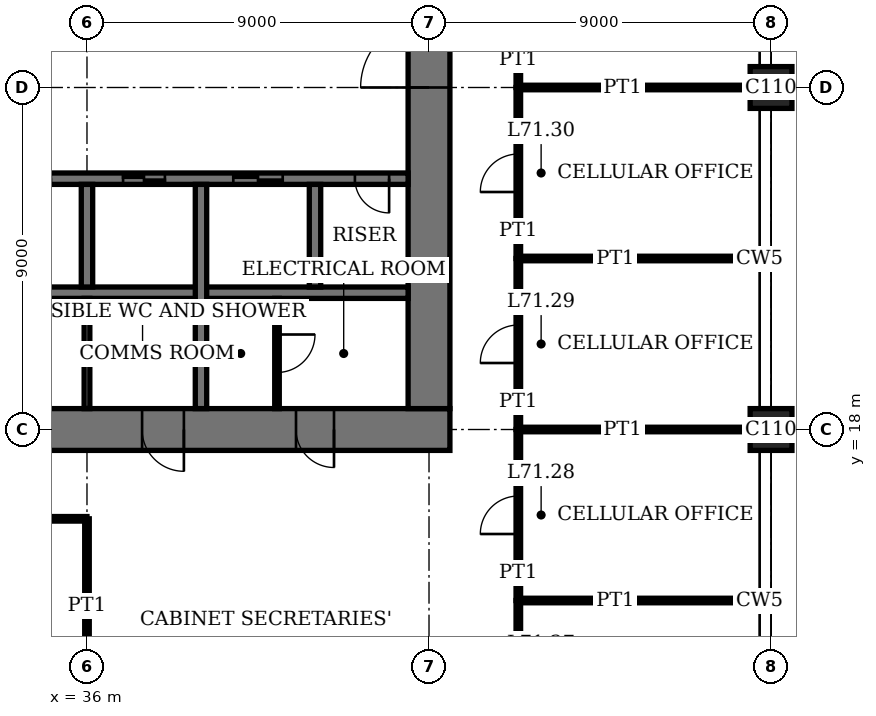
"""IFC4 building model, lengths in metres.
Left out: names, types, materials, properties, quantities, classifications, styles, units other than length and angle.
Written with IfcOpenShell. Run it as: python <this file> out.ifc"""

import sys

from ifc_helpers import new_model, si_unit, direction, frame, frame_2d, origin, origin_2d, place, context, subcontext, project, spatial, rectangle, extrude, element, fill, save


model = new_model("IFC4")
c1 = context("Model", 3, precision=1e-05, world=origin(), true_north=direction((0.0, 1.0)))
c2 = subcontext(c1, "Body", "Model", "MODEL_VIEW")
j1 = project(units=[si_unit("LENGTHUNIT", "METRE"), si_unit("PLANEANGLEUNIT", "RADIAN")], contexts=[c1])
p1 = place(None, origin())
s1 = spatial("IfcSite", under=j1, at=p1, CompositionType="ELEMENT")
p2 = place(p1, origin())
s2 = spatial("IfcBuilding", under=s1, at=p2, CompositionType="ELEMENT")
p3 = place(p2, frame((0.0, 0.0, 291.4)))
s3 = spatial("IfcBuildingStorey", under=s2, at=p3, CompositionType="ELEMENT", Elevation=291.4)
for number, where, z_axis, x_axis in (
    (1, (54.0, 18.0, 0.0), (0.0, 0.0, 1.0), (1.0, 0.0, 0.0)),
    (2, (54.0, 27.0, 0.0), (0.0, 0.0, 1.0), (1.0, 0.0, 0.0)),
):
    element("IfcColumn", number, at=place(p3, frame(where, z_axis=z_axis, x_axis=x_axis)), inside=s3, PredefinedType="COLUMN", context=c2, shape_type="SweptSolid", body=[
        extrude(rectangle(XDim=1.1, YDim=1.1, at=origin_2d()), origin(), (0.0, 0.0, 1.0), 4.0),
    ])
p4 = place(p3, frame((17.45, 18.0, 0.0), z_axis=(0.0, 0.0, 1.0), x_axis=(1.0, 0.0, 0.0)))
e3 = element("IfcWall", 3, at=p4, inside=s3, PredefinedType="SHEAR", context=c2, shape_type="SweptSolid", body=[
    extrude(rectangle(XDim=28.1, YDim=1.1, at=frame_2d((14.05, 0.0))), origin(), (0.0, 0.0, 1.0), 4.0),
])
p5 = place(p4, frame((11.55, 0.0, 0.0)))
e4 = element("IfcOpeningElement", 4, at=p5, cuts=e3, PredefinedType="OPENING", context=c2, shape_type="SweptSolid", body=[
    extrude(rectangle(XDim=1.0, YDim=2.4, at=frame_2d((0.5, 1.2))), frame((0.0, 0.56, 0.0), z_axis=(0.0, -1.0, 0.0), x_axis=(1.0, 0.0, 0.0)), (0.0, 0.0, 1.0), 1.12),
])
p6 = place(p4, frame((16.55, 0.0, 0.0)))
e5 = element("IfcOpeningElement", 5, at=p6, cuts=e3, PredefinedType="OPENING", context=c2, shape_type="SweptSolid", body=[
    extrude(rectangle(XDim=1.0, YDim=2.4, at=frame_2d((0.5, 1.2))), frame((0.0, 0.56, 0.0), z_axis=(0.0, -1.0, 0.0), x_axis=(1.0, 0.0, 0.0)), (0.0, 0.0, 1.0), 1.12),
])
p7 = place(p4, frame((20.0, 0.0, 0.0)))
e6 = element("IfcOpeningElement", 6, at=p7, cuts=e3, PredefinedType="OPENING", context=c2, shape_type="SweptSolid", body=[
    extrude(rectangle(XDim=1.1, YDim=2.4, at=frame_2d((0.55, 1.2))), frame((0.0, 0.56, 0.0), z_axis=(0.0, -1.0, 0.0), x_axis=(1.0, 0.0, 0.0)), (0.0, 0.0, 1.0), 1.12),
])
p8 = place(p4, frame((24.05, 0.0, 0.0)))
e7 = element("IfcOpeningElement", 7, at=p8, cuts=e3, PredefinedType="OPENING", context=c2, shape_type="SweptSolid", body=[
    extrude(rectangle(XDim=1.0, YDim=2.4, at=frame_2d((0.5, 1.2))), frame((0.0, 0.56, 0.0), z_axis=(0.0, -1.0, 0.0), x_axis=(1.0, 0.0, 0.0)), (0.0, 0.0, 1.0), 1.12),
])
p9 = place(p3, frame((45.0, 18.55, 0.0), z_axis=(0.0, 0.0, 1.0), x_axis=(0.0, 1.0, 0.0)))
e8 = element("IfcWall", 8, at=p9, inside=s3, PredefinedType="SHEAR", context=c2, shape_type="SweptSolid", body=[
    extrude(rectangle(XDim=16.9, YDim=1.1, at=frame_2d((8.45, 0.0))), origin(), (0.0, 0.0, 1.0), 4.0),
])
p10 = place(p9, frame((8.45, 0.0, 0.0)))
e9 = element("IfcOpeningElement", 9, at=p10, cuts=e8, PredefinedType="OPENING", context=c2, shape_type="SweptSolid", body=[
    extrude(rectangle(XDim=1.8, YDim=2.4, at=frame_2d((0.9, 1.2))), frame((0.0, 0.56, 0.0), z_axis=(0.0, -1.0, 0.0), x_axis=(1.0, 0.0, 0.0)), (0.0, 0.0, 1.0), 1.12),
])
p11 = place(p3, frame((18.55, 24.6, 0.0), z_axis=(0.0, 0.0, 1.0), x_axis=(1.0, 0.0, 0.0)))
e10 = element("IfcWall", 10, at=p11, inside=s3, PredefinedType="SHEAR", context=c2, shape_type="SweptSolid", body=[
    extrude(rectangle(XDim=25.9, YDim=0.3, at=frame_2d((12.95, 0.0))), origin(), (0.0, 0.0, 1.0), 4.0),
])
p12 = place(p11, frame((4.95, 0.0, 0.0)))
e11 = element("IfcOpeningElement", 11, at=p12, cuts=e10, PredefinedType="OPENING", context=c2, shape_type="SweptSolid", body=[
    extrude(rectangle(XDim=1.0, YDim=2.4, at=frame_2d((0.5, 1.2))), frame((0.0, 0.16, 0.0), z_axis=(0.0, -1.0, 0.0), x_axis=(1.0, 0.0, 0.0)), (0.0, 0.0, 1.0), 0.32),
])
p13 = place(p11, frame((24.5, 0.0, 0.0)))
e12 = element("IfcOpeningElement", 12, at=p13, cuts=e10, PredefinedType="OPENING", context=c2, shape_type="SweptSolid", body=[
    extrude(rectangle(XDim=0.9, YDim=2.1, at=frame_2d((0.45, 1.05))), frame((0.0, 0.16, 0.0), z_axis=(0.0, -1.0, 0.0), x_axis=(1.0, 0.0, 0.0)), (0.0, 0.0, 1.0), 0.32),
])
p14 = place(p11, frame((9.4, 0.0, 0.0)))
e13 = element("IfcOpeningElement", 13, at=p14, cuts=e10, PredefinedType="OPENING", context=c2, shape_type="SweptSolid", body=[
    extrude(rectangle(XDim=1.1, YDim=2.4, at=frame_2d((0.55, 1.2))), frame((0.0, 0.16, 0.0), z_axis=(0.0, -1.0, 0.0), x_axis=(1.0, 0.0, 0.0)), (0.0, 0.0, 1.0), 0.32),
])
p15 = place(p11, frame((12.4, 0.0, 0.0)))
e14 = element("IfcOpeningElement", 14, at=p15, cuts=e10, PredefinedType="OPENING", context=c2, shape_type="SweptSolid", body=[
    extrude(rectangle(XDim=1.1, YDim=2.4, at=frame_2d((0.55, 1.2))), frame((0.0, 0.16, 0.0), z_axis=(0.0, -1.0, 0.0), x_axis=(1.0, 0.0, 0.0)), (0.0, 0.0, 1.0), 0.32),
])
p16 = place(p11, frame((15.4, 0.0, 0.0)))
e15 = element("IfcOpeningElement", 15, at=p16, cuts=e10, PredefinedType="OPENING", context=c2, shape_type="SweptSolid", body=[
    extrude(rectangle(XDim=1.1, YDim=2.4, at=frame_2d((0.55, 1.2))), frame((0.0, 0.16, 0.0), z_axis=(0.0, -1.0, 0.0), x_axis=(1.0, 0.0, 0.0)), (0.0, 0.0, 1.0), 0.32),
])
p17 = place(p11, frame((18.4, 0.0, 0.0)))
e16 = element("IfcOpeningElement", 16, at=p17, cuts=e10, PredefinedType="OPENING", context=c2, shape_type="SweptSolid", body=[
    extrude(rectangle(XDim=1.1, YDim=2.4, at=frame_2d((0.55, 1.2))), frame((0.0, 0.16, 0.0), z_axis=(0.0, -1.0, 0.0), x_axis=(1.0, 0.0, 0.0)), (0.0, 0.0, 1.0), 0.32),
])
p18 = place(p11, frame((21.3, 0.0, 0.0)))
e17 = element("IfcOpeningElement", 17, at=p18, cuts=e10, PredefinedType="OPENING", context=c2, shape_type="SweptSolid", body=[
    extrude(rectangle(XDim=1.3, YDim=2.4, at=frame_2d((0.65, 1.2))), frame((0.0, 0.16, 0.0), z_axis=(0.0, -1.0, 0.0), x_axis=(1.0, 0.0, 0.0)), (0.0, 0.0, 1.0), 0.32),
])
p19 = place(p3, frame((27.15, 21.6, 0.0), z_axis=(0.0, 0.0, 1.0), x_axis=(1.0, 0.0, 0.0)))
e18 = element("IfcWall", 18, at=p19, inside=s3, PredefinedType="SHEAR", context=c2, shape_type="SweptSolid", body=[
    extrude(rectangle(XDim=17.3, YDim=0.3, at=frame_2d((8.65, 0.0))), origin(), (0.0, 0.0, 1.0), 4.0),
])
p20 = place(p3, frame((36.0, 21.75, 0.0), z_axis=(0.0, 0.0, 1.0), x_axis=(0.0, 1.0, 0.0)))
e19 = element("IfcWall", 19, at=p20, inside=s3, PredefinedType="SHEAR", context=c2, shape_type="SweptSolid", body=[
    extrude(rectangle(XDim=2.7, YDim=0.3, at=frame_2d((1.35, 0.0))), origin(), (0.0, 0.0, 1.0), 4.0),
])
p21 = place(p3, frame((39.0, 18.55, 0.0), z_axis=(0.0, 0.0, 1.0), x_axis=(0.0, 1.0, 0.0)))
e20 = element("IfcWall", 20, at=p21, inside=s3, PredefinedType="SHEAR", context=c2, shape_type="SweptSolid", body=[
    extrude(rectangle(XDim=5.9, YDim=0.3, at=frame_2d((2.95, 0.0))), origin(), (0.0, 0.0, 1.0), 4.0),
])
p22 = place(p3, frame((42.0, 21.75, 0.0), z_axis=(0.0, 0.0, 1.0), x_axis=(0.0, 1.0, 0.0)))
e21 = element("IfcWall", 21, at=p22, inside=s3, PredefinedType="SHEAR", context=c2, shape_type="SweptSolid", body=[
    extrude(rectangle(XDim=2.7, YDim=0.3, at=frame_2d((1.35, 0.0))), origin(), (0.0, 0.0, 1.0), 4.0),
])
p23 = place(p3, frame((47.35, 13.5, 0.0), z_axis=(0.0, 0.0, 1.0), x_axis=(1.0, 0.0, 0.0)))
e22 = element("IfcWall", 22, at=p23, inside=s3, PredefinedType="PARTITIONING", context=c2, shape_type="SweptSolid", body=[
    extrude(rectangle(XDim=6.34, YDim=0.12, at=frame_2d((3.17, 0.0))), origin(), (0.0, 0.0, 1.0), 3.1),
])
p24 = place(p3, frame((27.0, 15.65, 0.0), z_axis=(0.0, 0.0, 1.0), x_axis=(1.0, 0.0, 0.0)))
e23 = element("IfcWall", 23, at=p24, inside=s3, PredefinedType="PARTITIONING", context=c2, shape_type="SweptSolid", body=[
    extrude(rectangle(XDim=9.0, YDim=0.12, at=frame_2d((4.5, 0.0))), origin(), (0.0, 0.0, 1.0), 3.75),
])
p25 = place(p3, frame((47.35, 18.0, 0.0), z_axis=(0.0, 0.0, 1.0), x_axis=(1.0, 0.0, 0.0)))
e24 = element("IfcWall", 24, at=p25, inside=s3, PredefinedType="PARTITIONING", context=c2, shape_type="SweptSolid", body=[
    extrude(rectangle(XDim=6.1, YDim=0.12, at=frame_2d((3.05, 0.0))), origin(), (0.0, 0.0, 1.0), 3.05),
])
p26 = place(p3, frame((47.35, 22.5, 0.0), z_axis=(0.0, 0.0, 1.0), x_axis=(1.0, 0.0, 0.0)))
e25 = element("IfcWall", 25, at=p26, inside=s3, PredefinedType="PARTITIONING", context=c2, shape_type="SweptSolid", body=[
    extrude(rectangle(XDim=6.34, YDim=0.12, at=frame_2d((3.17, 0.0))), origin(), (0.0, 0.0, 1.0), 3.1),
])
p27 = place(p3, frame((47.35, 27.0, 0.0), z_axis=(0.0, 0.0, 1.0), x_axis=(1.0, 0.0, 0.0)))
e26 = element("IfcWall", 26, at=p27, inside=s3, PredefinedType="PARTITIONING", context=c2, shape_type="SweptSolid", body=[
    extrude(rectangle(XDim=6.1, YDim=0.12, at=frame_2d((3.05, 0.0))), origin(), (0.0, 0.0, 1.0), 3.05),
])
p28 = place(p3, frame((36.0, 11.05, 0.0), z_axis=(0.0, 0.0, 1.0), x_axis=(0.0, 1.0, 0.0)))
e27 = element("IfcWall", 27, at=p28, inside=s3, PredefinedType="PARTITIONING", context=c2, shape_type="SweptSolid", body=[
    extrude(rectangle(XDim=4.6, YDim=0.12, at=frame_2d((2.3, 0.0))), origin(), (0.0, 0.0, 1.0), 3.05),
])
p29 = place(p3, frame((47.35, 9.0, 0.0), z_axis=(0.0, 0.0, 1.0), x_axis=(0.0, 1.0, 0.0)))
e28 = element("IfcWall", 28, at=p29, inside=s3, PredefinedType="PARTITIONING", context=c2, shape_type="SweptSolid", body=[
    extrude(rectangle(XDim=4.5, YDim=0.12, at=frame_2d((2.25, 0.0))), origin(), (0.0, 0.0, 1.0), 3.75),
])
p30 = place(p29, frame((1.75, 0.0, 0.0)))
e29 = element("IfcOpeningElement", 29, at=p30, cuts=e28, PredefinedType="OPENING", context=c2, shape_type="SweptSolid", body=[
    extrude(rectangle(XDim=1.0, YDim=2.4, at=frame_2d((0.5, 1.2))), frame((0.0, 0.07, 0.0), z_axis=(0.0, -1.0, 0.0), x_axis=(1.0, 0.0, 0.0)), (0.0, 0.0, 1.0), 0.14),
])
p31 = place(p3, frame((47.35, 13.5, 0.0), z_axis=(0.0, 0.0, 1.0), x_axis=(0.0, 1.0, 0.0)))
e30 = element("IfcWall", 30, at=p31, inside=s3, PredefinedType="PARTITIONING", context=c2, shape_type="SweptSolid", body=[
    extrude(rectangle(XDim=4.5, YDim=0.12, at=frame_2d((2.25, 0.0))), origin(), (0.0, 0.0, 1.0), 3.75),
])
p32 = place(p31, frame((1.75, 0.0, 0.0)))
e31 = element("IfcOpeningElement", 31, at=p32, cuts=e30, PredefinedType="OPENING", context=c2, shape_type="SweptSolid", body=[
    extrude(rectangle(XDim=1.0, YDim=2.4, at=frame_2d((0.5, 1.2))), frame((0.0, 0.07, 0.0), z_axis=(0.0, -1.0, 0.0), x_axis=(1.0, 0.0, 0.0)), (0.0, 0.0, 1.0), 0.14),
])
p33 = place(p3, frame((47.35, 18.0, 0.0), z_axis=(0.0, 0.0, 1.0), x_axis=(0.0, 1.0, 0.0)))
e32 = element("IfcWall", 32, at=p33, inside=s3, PredefinedType="PARTITIONING", context=c2, shape_type="SweptSolid", body=[
    extrude(rectangle(XDim=4.5, YDim=0.12, at=frame_2d((2.25, 0.0))), origin(), (0.0, 0.0, 1.0), 3.75),
])
p34 = place(p33, frame((1.75, 0.0, 0.0)))
e33 = element("IfcOpeningElement", 33, at=p34, cuts=e32, PredefinedType="OPENING", context=c2, shape_type="SweptSolid", body=[
    extrude(rectangle(XDim=1.0, YDim=2.4, at=frame_2d((0.5, 1.2))), frame((0.0, 0.07, 0.0), z_axis=(0.0, -1.0, 0.0), x_axis=(1.0, 0.0, 0.0)), (0.0, 0.0, 1.0), 0.14),
])
p35 = place(p3, frame((47.35, 22.5, 0.0), z_axis=(0.0, 0.0, 1.0), x_axis=(0.0, 1.0, 0.0)))
e34 = element("IfcWall", 34, at=p35, inside=s3, PredefinedType="PARTITIONING", context=c2, shape_type="SweptSolid", body=[
    extrude(rectangle(XDim=4.5, YDim=0.12, at=frame_2d((2.25, 0.0))), origin(), (0.0, 0.0, 1.0), 3.75),
])
p36 = place(p35, frame((1.75, 0.0, 0.0)))
e35 = element("IfcOpeningElement", 35, at=p36, cuts=e34, PredefinedType="OPENING", context=c2, shape_type="SweptSolid", body=[
    extrude(rectangle(XDim=1.0, YDim=2.4, at=frame_2d((0.5, 1.2))), frame((0.0, 0.07, 0.0), z_axis=(0.0, -1.0, 0.0), x_axis=(1.0, 0.0, 0.0)), (0.0, 0.0, 1.0), 0.14),
])
p37 = place(p3, frame((47.35, 27.0, 0.0), z_axis=(0.0, 0.0, 1.0), x_axis=(0.0, 1.0, 0.0)))
e36 = element("IfcWall", 36, at=p37, inside=s3, PredefinedType="PARTITIONING", context=c2, shape_type="SweptSolid", body=[
    extrude(rectangle(XDim=4.5, YDim=0.12, at=frame_2d((2.25, 0.0))), origin(), (0.0, 0.0, 1.0), 3.75),
])
p38 = place(p37, frame((1.75, 0.0, 0.0)))
e37 = element("IfcOpeningElement", 37, at=p38, cuts=e36, PredefinedType="OPENING", context=c2, shape_type="SweptSolid", body=[
    extrude(rectangle(XDim=1.0, YDim=2.4, at=frame_2d((0.5, 1.2))), frame((0.0, 0.07, 0.0), z_axis=(0.0, -1.0, 0.0), x_axis=(1.0, 0.0, 0.0)), (0.0, 0.0, 1.0), 0.14),
])
p39 = place(p3, frame((36.0, 18.55, 0.0), z_axis=(0.0, 0.0, 1.0), x_axis=(0.0, 1.0, 0.0)))
e38 = element("IfcWall", 38, at=p39, inside=s3, PredefinedType="PARTITIONING", context=c2, shape_type="SweptSolid", body=[
    extrude(rectangle(XDim=2.9, YDim=0.15, at=frame_2d((1.45, 0.0))), origin(), (0.0, 0.0, 1.0), 3.75),
])
p40 = place(p3, frame((41.0, 18.55, 0.0), z_axis=(0.0, 0.0, 1.0), x_axis=(0.0, 1.0, 0.0)))
e39 = element("IfcWall", 39, at=p40, inside=s3, PredefinedType="PARTITIONING", context=c2, shape_type="SweptSolid", body=[
    extrude(rectangle(XDim=2.9, YDim=0.12, at=frame_2d((1.45, 0.0))), origin(), (0.0, 0.0, 1.0), 3.75),
])
p41 = place(p40, frame((0.95, 0.0, 0.0)))
e40 = element("IfcOpeningElement", 40, at=p41, cuts=e39, PredefinedType="OPENING", context=c2, shape_type="SweptSolid", body=[
    extrude(rectangle(XDim=1.0, YDim=2.4, at=frame_2d((0.5, 1.2))), frame((0.0, 0.07, 0.0), z_axis=(0.0, -1.0, 0.0), x_axis=(1.0, 0.0, 0.0)), (0.0, 0.0, 1.0), 0.14),
])
p42 = place(p10, origin())
e41 = element("IfcDoor", 41, at=p42, inside=s3, OperationType="DOUBLE_DOOR_DOUBLE_SWING", PredefinedType="DOOR", context=c2, shape_type="SweptSolid", body=[
    extrude(rectangle(XDim=1.8, YDim=2.4, at=frame_2d((0.9, 1.2))), frame((0.0, 0.03, 0.0), z_axis=(0.0, -1.0, 0.0), x_axis=(1.0, 0.0, 0.0)), (0.0, 0.0, 1.0), 0.06),
    extrude(rectangle(XDim=0.04, YDim=2.4, at=frame_2d((0.02, 1.2))), frame((0.0, 0.55, 0.0), z_axis=(0.0, -1.0, 0.0), x_axis=(1.0, 0.0, 0.0)), (0.0, 0.0, 1.0), 1.1),
    extrude(rectangle(XDim=0.04, YDim=2.4, at=frame_2d((1.78, 1.2))), frame((0.0, 0.55, 0.0), z_axis=(0.0, -1.0, 0.0), x_axis=(1.0, 0.0, 0.0)), (0.0, 0.0, 1.0), 1.1),
    extrude(rectangle(XDim=1.8, YDim=0.04, at=frame_2d((0.9, 2.38))), frame((0.0, 0.55, 0.0), z_axis=(0.0, -1.0, 0.0), x_axis=(1.0, 0.0, 0.0)), (0.0, 0.0, 1.0), 1.1),
])
fill(e9, e41)
p43 = place(p7, origin())
e42 = element("IfcDoor", 42, at=p43, inside=s3, OperationType="SINGLE_SWING_RIGHT", PredefinedType="DOOR", context=c2, shape_type="SweptSolid", body=[
    extrude(rectangle(XDim=1.1, YDim=2.4, at=frame_2d((0.55, 1.2))), frame((0.0, 0.025, 0.0), z_axis=(0.0, -1.0, 0.0), x_axis=(1.0, 0.0, 0.0)), (0.0, 0.0, 1.0), 0.05),
    extrude(rectangle(XDim=0.04, YDim=2.4, at=frame_2d((0.02, 1.2))), frame((0.0, 0.44, 0.0), z_axis=(0.0, -1.0, 0.0), x_axis=(1.0, 0.0, 0.0)), (0.0, 0.0, 1.0), 0.88),
    extrude(rectangle(XDim=0.04, YDim=2.4, at=frame_2d((1.08, 1.2))), frame((0.0, 0.44, 0.0), z_axis=(0.0, -1.0, 0.0), x_axis=(1.0, 0.0, 0.0)), (0.0, 0.0, 1.0), 0.88),
    extrude(rectangle(XDim=1.1, YDim=0.04, at=frame_2d((0.55, 2.38))), frame((0.0, 0.44, 0.0), z_axis=(0.0, -1.0, 0.0), x_axis=(1.0, 0.0, 0.0)), (0.0, 0.0, 1.0), 0.88),
])
fill(e6, e42)
p44 = place(p8, origin())
e43 = element("IfcDoor", 43, at=p44, inside=s3, OperationType="SINGLE_SWING_RIGHT", PredefinedType="DOOR", context=c2, shape_type="SweptSolid", body=[
    extrude(rectangle(XDim=1.0, YDim=2.4, at=frame_2d((0.5, 1.2))), frame((0.0, 0.025, 0.0), z_axis=(0.0, -1.0, 0.0), x_axis=(1.0, 0.0, 0.0)), (0.0, 0.0, 1.0), 0.05),
    extrude(rectangle(XDim=0.04, YDim=2.4, at=frame_2d((0.02, 1.2))), frame((0.0, 0.4, 0.0), z_axis=(0.0, -1.0, 0.0), x_axis=(1.0, 0.0, 0.0)), (0.0, 0.0, 1.0), 0.8),
    extrude(rectangle(XDim=0.04, YDim=2.4, at=frame_2d((0.98, 1.2))), frame((0.0, 0.4, 0.0), z_axis=(0.0, -1.0, 0.0), x_axis=(1.0, 0.0, 0.0)), (0.0, 0.0, 1.0), 0.8),
    extrude(rectangle(XDim=1.0, YDim=0.04, at=frame_2d((0.5, 2.38))), frame((0.0, 0.4, 0.0), z_axis=(0.0, -1.0, 0.0), x_axis=(1.0, 0.0, 0.0)), (0.0, 0.0, 1.0), 0.8),
])
fill(e7, e43)
p45 = place(p13, origin())
e44 = element("IfcDoor", 44, at=p45, inside=s3, OperationType="SINGLE_SWING_RIGHT", PredefinedType="DOOR", context=c2, shape_type="SweptSolid", body=[
    extrude(rectangle(XDim=0.9, YDim=2.1, at=frame_2d((0.45, 1.05))), frame((0.0, 0.03, 0.0), z_axis=(0.0, -1.0, 0.0), x_axis=(1.0, 0.0, 0.0)), (0.0, 0.0, 1.0), 0.06),
])
fill(e12, e44)
p46 = place(p32, origin())
e45 = element("IfcDoor", 45, at=p46, inside=s3, OperationType="SINGLE_SWING_RIGHT", PredefinedType="DOOR", context=c2, shape_type="SweptSolid", body=[
    extrude(rectangle(XDim=1.0, YDim=2.4, at=frame_2d((0.5, 1.2))), frame((0.0, 0.025, 0.0), z_axis=(0.0, -1.0, 0.0), x_axis=(1.0, 0.0, 0.0)), (0.0, 0.0, 1.0), 0.05),
])
fill(e31, e45)
p47 = place(p34, origin())
e46 = element("IfcDoor", 46, at=p47, inside=s3, OperationType="SINGLE_SWING_RIGHT", PredefinedType="DOOR", context=c2, shape_type="SweptSolid", body=[
    extrude(rectangle(XDim=1.0, YDim=2.4, at=frame_2d((0.5, 1.2))), frame((0.0, 0.025, 0.0), z_axis=(0.0, -1.0, 0.0), x_axis=(1.0, 0.0, 0.0)), (0.0, 0.0, 1.0), 0.05),
])
fill(e33, e46)
p48 = place(p36, origin())
e47 = element("IfcDoor", 47, at=p48, inside=s3, OperationType="SINGLE_SWING_RIGHT", PredefinedType="DOOR", context=c2, shape_type="SweptSolid", body=[
    extrude(rectangle(XDim=1.0, YDim=2.4, at=frame_2d((0.5, 1.2))), frame((0.0, 0.025, 0.0), z_axis=(0.0, -1.0, 0.0), x_axis=(1.0, 0.0, 0.0)), (0.0, 0.0, 1.0), 0.05),
])
fill(e35, e47)
p49 = place(p41, origin())
e48 = element("IfcDoor", 48, at=p49, inside=s3, OperationType="SINGLE_SWING_RIGHT", PredefinedType="DOOR", context=c2, shape_type="SweptSolid", body=[
    extrude(rectangle(XDim=1.0, YDim=2.4, at=frame_2d((0.5, 1.2))), frame((0.0, 0.03, 0.0), z_axis=(0.0, -1.0, 0.0), x_axis=(1.0, 0.0, 0.0)), (0.0, 0.0, 1.0), 0.06),
])
fill(e40, e48)
p50 = place(p17, origin())
e49 = element("IfcDoor", 49, at=p50, inside=s3, OperationType="DOUBLE_DOOR_SLIDING", PredefinedType="DOOR", context=c2, shape_type="SweptSolid", body=[
    extrude(rectangle(XDim=1.1, YDim=2.4, at=frame_2d((0.55, 1.2))), frame((0.0, 0.02, 0.0), z_axis=(0.0, -1.0, 0.0), x_axis=(1.0, 0.0, 0.0)), (0.0, 0.0, 1.0), 0.04),
])
fill(e16, e49)
p51 = place(p18, origin())
e50 = element("IfcDoor", 50, at=p51, inside=s3, OperationType="DOUBLE_DOOR_SLIDING", PredefinedType="DOOR", context=c2, shape_type="SweptSolid", body=[
    extrude(rectangle(XDim=1.3, YDim=2.4, at=frame_2d((0.65, 1.2))), frame((0.0, 0.02, 0.0), z_axis=(0.0, -1.0, 0.0), x_axis=(1.0, 0.0, 0.0)), (0.0, 0.0, 1.0), 0.04),
])
fill(e17, e50)
save(model, sys.argv[1])
